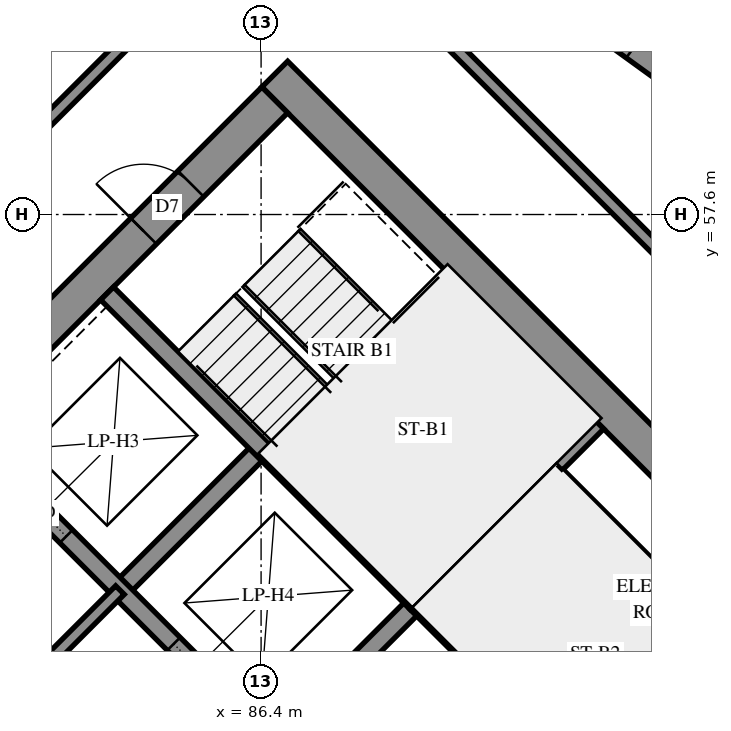
"""IFC4 building model, lengths in metres.
Left out: names, types, materials, properties, quantities, classifications, styles, units other than length and angle.
Written with IfcOpenShell. Run it as: python <this file> out.ifc"""

import sys

from ifc_helpers import new_model, si_unit, direction, frame, frame_2d, origin, place, context, subcontext, project, spatial, polyline, rectangle, outline, extrude, element, fill, save


model = new_model("IFC4")
c1 = context("Model", 3, precision=1e-05, world=origin(), true_north=direction((0.0, 1.0)))
c2 = subcontext(c1, "Body", "Model", "MODEL_VIEW")
j1 = project(units=[si_unit("LENGTHUNIT", "METRE"), si_unit("PLANEANGLEUNIT", "RADIAN")], contexts=[c1])
p1 = place(None, origin())
s1 = spatial("IfcSite", under=j1, at=p1, CompositionType="ELEMENT")
p2 = place(p1, origin())
s2 = spatial("IfcBuilding", under=s1, at=p2, CompositionType="ELEMENT")
p3 = place(p2, frame((0.0, 0.0, 162.6)))
s3 = spatial("IfcBuildingStorey", under=s2, at=p3, CompositionType="ELEMENT", Elevation=162.6)
p4 = place(p3, frame((86.625, 59.908, -0.3), z_axis=(0.0, 0.0, 1.0), x_axis=(0.7071067812, -0.7071067812, 0.0)))
e1 = element("IfcWall", 1, at=p4, inside=s3, PredefinedType="SHEAR", context=c2, shape_type="SweptSolid", body=[
    extrude(rectangle(XDim=15.6, YDim=0.6, at=frame_2d((7.8, 0.0))), origin(), (0.0, 0.0, 1.0), 2.7),
])
p5 = place(p4, frame((10.6, 0.0, 0.3)))
e2 = element("IfcOpeningElement", 2, at=p5, cuts=e1, PredefinedType="OPENING", context=c2, shape_type="SweptSolid", body=[
    extrude(rectangle(XDim=0.8, YDim=2.1, at=frame_2d((0.4, 1.05))), frame((0.0, 0.31, 0.0), z_axis=(0.0, -1.0, 0.0), x_axis=(1.0, 0.0, 0.0)), (0.0, 0.0, 1.0), 0.62),
])
p6 = place(p3, frame((76.442, 49.302, -0.3), z_axis=(0.0, 0.0, 1.0), x_axis=(0.7071067812, 0.7071067812, 0.0)))
e3 = element("IfcWall", 3, at=p6, inside=s3, PredefinedType="SHEAR", context=c2, shape_type="SweptSolid", body=[
    extrude(rectangle(XDim=14.4, YDim=0.6, at=frame_2d((7.2, 0.0))), origin(), (0.0, 0.0, 1.0), 2.7),
])
p7 = place(p6, frame((4.55, 0.0, 0.3)))
e4 = element("IfcOpeningElement", 4, at=p7, cuts=e3, PredefinedType="OPENING", context=c2, shape_type="SweptSolid", body=[
    extrude(rectangle(XDim=1.1, YDim=2.1, at=frame_2d((0.55, 1.05))), frame((0.0, 0.31, 0.0), z_axis=(0.0, -1.0, 0.0), x_axis=(1.0, 0.0, 0.0)), (0.0, 0.0, 1.0), 0.62),
])
p8 = place(p6, frame((11.35, 0.0, 0.3)))
e5 = element("IfcOpeningElement", 5, at=p8, cuts=e3, PredefinedType="OPENING", context=c2, shape_type="SweptSolid", body=[
    extrude(rectangle(XDim=1.1, YDim=2.1, at=frame_2d((0.55, 1.05))), frame((0.0, 0.31, 0.0), z_axis=(0.0, -1.0, 0.0), x_axis=(1.0, 0.0, 0.0)), (0.0, 0.0, 1.0), 0.62),
])
p9 = place(p3, frame((84.079, 51.423, 0.0), z_axis=(0.0, 0.0, 1.0), x_axis=(0.7071219326, 0.7070916295, 0.0)))
e6 = element("IfcWall", 6, at=p9, inside=s3, PredefinedType="SOLIDWALL", context=c2, shape_type="SweptSolid", body=[
    extrude(rectangle(XDim=3.3, YDim=0.3, at=frame_2d((1.65, 0.0))), origin(), (0.0, 0.0, 1.0), 3.1),
])
p10 = place(p3, frame((86.625, 48.878, 0.0), z_axis=(0.0, 0.0, 1.0), x_axis=(0.7071067812, 0.7071067812, 0.0)))
e7 = element("IfcWall", 7, at=p10, inside=s3, PredefinedType="SOLIDWALL", context=c2, shape_type="SweptSolid", body=[
    extrude(rectangle(XDim=3.3, YDim=0.3, at=frame_2d((1.65, 0.0))), origin(), (0.0, 0.0, 1.0), 3.1),
])
p11 = place(p3, frame((78.988, 51.423, 0.0), z_axis=(0.0, 0.0, 1.0), x_axis=(0.7071067812, -0.7071067812, 0.0)))
e8 = element("IfcWall", 8, at=p11, inside=s3, PredefinedType="SOLIDWALL", context=c2, shape_type="SweptSolid", body=[
    extrude(rectangle(XDim=14.4, YDim=0.3, at=frame_2d((7.2, 0.0))), origin(), (0.0, 0.0, 1.0), 3.1),
])
p12 = place(p11, frame((1.35, 0.0, 0.0)))
e9 = element("IfcOpeningElement", 9, at=p12, cuts=e8, PredefinedType="OPENING", context=c2, shape_type="SweptSolid", body=[
    extrude(rectangle(XDim=0.9, YDim=2.1, at=frame_2d((0.45, 1.05))), frame((0.0, 0.16, 0.0), z_axis=(0.0, -1.0, 0.0), x_axis=(1.0, 0.0, 0.0)), (0.0, 0.0, 1.0), 0.32),
])
p13 = place(p11, frame((4.95, 0.0, 0.0)))
e10 = element("IfcOpeningElement", 10, at=p13, cuts=e8, PredefinedType="OPENING", context=c2, shape_type="SweptSolid", body=[
    extrude(rectangle(XDim=0.9, YDim=2.1, at=frame_2d((0.45, 1.05))), frame((0.0, 0.16, 0.0), z_axis=(0.0, -1.0, 0.0), x_axis=(1.0, 0.0, 0.0)), (0.0, 0.0, 1.0), 0.32),
])
p14 = place(p11, frame((8.55, 0.0, 0.0)))
e11 = element("IfcOpeningElement", 11, at=p14, cuts=e8, PredefinedType="OPENING", context=c2, shape_type="SweptSolid", body=[
    extrude(rectangle(XDim=0.9, YDim=2.1, at=frame_2d((0.45, 1.05))), frame((0.0, 0.16, 0.0), z_axis=(0.0, -1.0, 0.0), x_axis=(1.0, 0.0, 0.0)), (0.0, 0.0, 1.0), 0.32),
])
p15 = place(p11, frame((12.05, 0.0, 0.0)))
e12 = element("IfcOpeningElement", 12, at=p15, cuts=e8, PredefinedType="OPENING", context=c2, shape_type="SweptSolid", body=[
    extrude(rectangle(XDim=1.1, YDim=2.1, at=frame_2d((0.55, 1.05))), frame((0.0, 0.16, 0.0), z_axis=(0.0, -1.0, 0.0), x_axis=(1.0, 0.0, 0.0)), (0.0, 0.0, 1.0), 0.32),
])
p16 = place(p3, frame((81.534, 53.969, 0.0), z_axis=(0.0, 0.0, 1.0), x_axis=(0.707103309, -0.7071102534, 0.0)))
e13 = element("IfcWall", 13, at=p16, inside=s3, PredefinedType="SOLIDWALL", context=c2, shape_type="SweptSolid", body=[
    extrude(rectangle(XDim=14.4, YDim=0.3, at=frame_2d((7.2, 0.0))), origin(), (0.0, 0.0, 1.0), 3.1),
])
p17 = place(p16, frame((1.25, 0.0, 0.0)))
e14 = element("IfcOpeningElement", 14, at=p17, cuts=e13, PredefinedType="OPENING", context=c2, shape_type="SweptSolid", body=[
    extrude(rectangle(XDim=1.1, YDim=2.1, at=frame_2d((0.55, 1.05))), frame((0.0, 0.16, 0.0), z_axis=(0.0, -1.0, 0.0), x_axis=(1.0, 0.0, 0.0)), (0.0, 0.0, 1.0), 0.32),
])
p18 = place(p16, frame((4.85, 0.0, 0.0)))
e15 = element("IfcOpeningElement", 15, at=p18, cuts=e13, PredefinedType="OPENING", context=c2, shape_type="SweptSolid", body=[
    extrude(rectangle(XDim=1.1, YDim=2.1, at=frame_2d((0.55, 1.05))), frame((0.0, 0.16, 0.0), z_axis=(0.0, -1.0, 0.0), x_axis=(1.0, 0.0, 0.0)), (0.0, 0.0, 1.0), 0.32),
])
p19 = place(p16, frame((8.45, 0.0, 0.0)))
e16 = element("IfcOpeningElement", 16, at=p19, cuts=e13, PredefinedType="OPENING", context=c2, shape_type="SweptSolid", body=[
    extrude(rectangle(XDim=1.1, YDim=2.1, at=frame_2d((0.55, 1.05))), frame((0.0, 0.16, 0.0), z_axis=(0.0, -1.0, 0.0), x_axis=(1.0, 0.0, 0.0)), (0.0, 0.0, 1.0), 0.32),
])
p20 = place(p16, frame((12.05, 0.0, 0.0)))
e17 = element("IfcOpeningElement", 17, at=p20, cuts=e13, PredefinedType="OPENING", context=c2, shape_type="SweptSolid", body=[
    extrude(rectangle(XDim=1.1, YDim=2.1, at=frame_2d((0.55, 1.05))), frame((0.0, 0.16, 0.0), z_axis=(0.0, -1.0, 0.0), x_axis=(1.0, 0.0, 0.0)), (0.0, 0.0, 1.0), 0.32),
])
for number, where, z_axis, x_axis in (
    (18, (83.867, 56.302, 0.0), (0.0, 0.0, 1.0), (0.707, -0.707, 0.0)),
    (19, (88.958, 51.211, 0.0), (0.0, 0.0, 1.0), (0.707, -0.707, 0.0)),
):
    element("IfcWall", number, at=place(p3, frame(where, z_axis=z_axis, x_axis=x_axis)), inside=s3, PredefinedType="SOLIDWALL", context=c2, shape_type="SweptSolid", body=[
        extrude(rectangle(XDim=7.2, YDim=0.3, at=frame_2d((3.6, 0.0))), origin(), (0.0, 0.0, 1.0), 3.1),
    ])
p21 = place(p3, frame((88.958, 51.211, 0.0), z_axis=(0.0, 0.0, 1.0), x_axis=(0.7071067812, 0.7071067812, 0.0)))
e20 = element("IfcWall", 20, at=p21, inside=s3, PredefinedType="SOLIDWALL", context=c2, shape_type="SweptSolid", body=[
    extrude(rectangle(XDim=4.2, YDim=0.3, at=frame_2d((2.1, 0.0))), origin(), (0.0, 0.0, 1.0), 3.1),
])
p22 = place(p3, frame((93.91, 59.395, 0.0), z_axis=(0.0, 0.0, 1.0), x_axis=(-0.8101104885, 0.5862772351, 0.0)))
e21 = element("IfcWall", 21, at=p22, inside=s3, PredefinedType="SOLIDWALL", context=c2, shape_type="SweptSolid", body=[
    extrude(outline(polyline([(-0.04, -0.25), (3.384, -0.25), (3.464, 0.25), (0.04, 0.25), (-0.04, -0.25)])), origin(), (0.0, 0.0, 1.0), 3.1),
])
p23 = place(p22, frame((1.678, 0.0, 0.45)))
e22 = element("IfcOpeningElement", 22, at=p23, cuts=e21, PredefinedType="OPENING", context=c2, shape_type="SweptSolid", body=[
    extrude(rectangle(XDim=1.2, YDim=2.5, at=frame_2d((0.6, 1.25))), frame((0.0, 0.26, 0.0), z_axis=(0.0, -1.0, 0.0), x_axis=(1.0, 0.0, 0.0)), (0.0, 0.0, 1.0), 0.52),
])
p24 = place(p3, frame((91.313, 53.354, 0.0), z_axis=(0.0, 0.0, 1.0), x_axis=(0.7071067812, -0.7071067812, 0.0)))
e23 = element("IfcWall", 23, at=p24, inside=s3, PredefinedType="PARTITIONING", context=c2, shape_type="SweptSolid", body=[
    extrude(rectangle(XDim=5.65, YDim=0.15, at=frame_2d((2.825, 0.0))), origin(), (0.0, 0.0, 1.0), 3.1),
])
p25 = place(p3, frame((81.534, 48.878, 0.0), z_axis=(0.0, 0.0, 1.0), x_axis=(0.707092892, 0.7071206701, 0.0)))
e24 = element("IfcWall", 24, at=p25, inside=s3, PredefinedType="PARTITIONING", context=c2, shape_type="SweptSolid", body=[
    extrude(rectangle(XDim=3.6, YDim=0.2, at=frame_2d((1.8, 0.0))), origin(), (0.0, 0.0, 1.0), 3.1),
])
p26 = place(p3, frame((86.841, 63.093, 0.0), z_axis=(0.0, 0.0, 1.0), x_axis=(0.7071067812, -0.7071067812, 0.0)))
e25 = element("IfcWall", 25, at=p26, inside=s3, PredefinedType="PARTITIONING", context=c2, shape_type="SweptSolid", body=[
    extrude(rectangle(XDim=12.239, YDim=0.2, at=frame_2d((6.119, 0.0))), origin(), (0.0, 0.0, 1.0), 3.1),
])
p27 = place(p3, frame((79.799, 56.055, 0.0), z_axis=(0.0, 0.0, 1.0), x_axis=(0.7071067812, 0.7071067812, 0.0)))
e26 = element("IfcWall", 26, at=p27, inside=s3, PredefinedType="PARTITIONING", context=c2, shape_type="SweptSolid", body=[
    extrude(rectangle(XDim=9.95, YDim=0.2, at=frame_2d((4.975, 0.0))), origin(), (0.0, 0.0, 1.0), 3.1),
])
p28 = place(p27, frame((1.071, 0.0, 0.0)))
e27 = element("IfcOpeningElement", 27, at=p28, cuts=e26, PredefinedType="OPENING", context=c2, shape_type="SweptSolid", body=[
    extrude(rectangle(XDim=1.0, YDim=2.1, at=frame_2d((0.5, 1.05))), frame((0.0, 0.11, 0.0), z_axis=(0.0, -1.0, 0.0), x_axis=(1.0, 0.0, 0.0)), (0.0, 0.0, 1.0), 0.22),
])
p29 = place(p23, origin())
e28 = element("IfcWindow", 28, at=p29, inside=s3, PartitioningType="SINGLE_PANEL", PredefinedType="WINDOW", context=c2, shape_type="SweptSolid", body=[
    extrude(rectangle(XDim=1.2, YDim=2.5, at=frame_2d((0.6, 1.25))), frame((0.0, 0.18, 0.0), z_axis=(0.0, -1.0, 0.0), x_axis=(1.0, 0.0, 0.0)), (0.0, 0.0, 1.0), 0.06),
])
fill(e22, e28)
p30 = place(p8, origin())
e29 = element("IfcDoor", 29, at=p30, inside=s3, OperationType="SINGLE_SWING_LEFT", PredefinedType="DOOR", context=c2, shape_type="SweptSolid", body=[
    extrude(rectangle(XDim=1.1, YDim=2.1, at=frame_2d((0.55, 1.05))), frame((0.0, 0.025, 0.0), z_axis=(0.0, -1.0, 0.0), x_axis=(1.0, 0.0, 0.0)), (0.0, 0.0, 1.0), 0.05),
])
fill(e5, e29)
p31 = place(p17, origin())
e30 = element("IfcDoor", 30, at=p31, inside=s3, OperationType="SLIDING_TO_LEFT", PredefinedType="DOOR", context=c2, shape_type="SweptSolid", body=[
    extrude(rectangle(XDim=1.1, YDim=2.1, at=frame_2d((0.55, 1.05))), frame((0.0, 0.025, 0.0), z_axis=(0.0, -1.0, 0.0), x_axis=(1.0, 0.0, 0.0)), (0.0, 0.0, 1.0), 0.05),
])
fill(e14, e30)
p32 = place(p18, origin())
e31 = element("IfcDoor", 31, at=p32, inside=s3, OperationType="SLIDING_TO_RIGHT", PredefinedType="DOOR", context=c2, shape_type="SweptSolid", body=[
    extrude(rectangle(XDim=1.1, YDim=2.1, at=frame_2d((0.55, 1.05))), frame((0.0, 0.025, 0.0), z_axis=(0.0, -1.0, 0.0), x_axis=(1.0, 0.0, 0.0)), (0.0, 0.0, 1.0), 0.05),
])
fill(e15, e31)
save(model, sys.argv[1])
